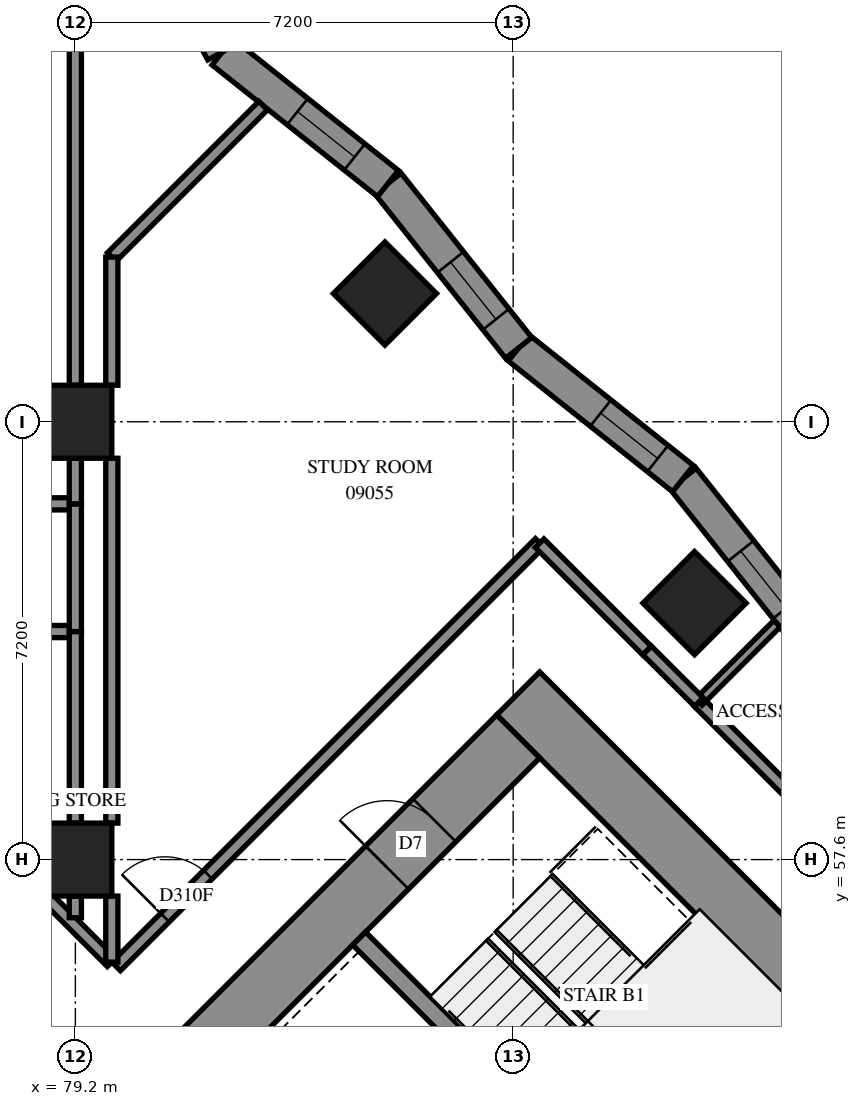
"""IFC4 building model, lengths in metres.
Left out: names, types, materials, properties, quantities, classifications, styles, units other than length and angle.
Written with IfcOpenShell. Run it as: python <this file> out.ifc"""

import sys

from ifc_helpers import new_model, si_unit, direction, frame, frame_2d, origin, origin_2d, place, context, subcontext, project, spatial, polyline, rectangle, outline, extrude, element, fill, save


model = new_model("IFC4")
c1 = context("Model", 3, precision=1e-05, world=origin(), true_north=direction((0.0, 1.0)))
c2 = subcontext(c1, "Body", "Model", "MODEL_VIEW")
j1 = project(units=[si_unit("LENGTHUNIT", "METRE"), si_unit("PLANEANGLEUNIT", "RADIAN")], contexts=[c1])
p1 = place(None, origin())
s1 = spatial("IfcSite", under=j1, at=p1, CompositionType="ELEMENT")
p2 = place(p1, origin())
s2 = spatial("IfcBuilding", under=s1, at=p2, CompositionType="ELEMENT")
p3 = place(p2, frame((0.0, 0.0, 37.2)))
s3 = spatial("IfcBuildingStorey", under=s2, at=p3, CompositionType="ELEMENT", Elevation=37.2)
for number, where, z_axis, x_axis in (
    (1, (79.2, 57.6, 0.0), (0.0, 0.0, 1.0), (1.0, 0.0, 0.0)),
    (2, (79.2, 64.8, 0.0), (0.0, 0.0, 1.0), (1.0, 0.0, 0.0)),
    (3, (84.291, 66.909, 0.0), (0.0, 0.0, 1.0), (0.707, -0.707, 0.0)),
    (4, (89.382, 61.818, 0.0), (0.0, 0.0, 1.0), (0.707, -0.707, 0.0)),
):
    element("IfcColumn", number, at=place(p3, frame(where, z_axis=z_axis, x_axis=x_axis)), inside=s3, PredefinedType="COLUMN", context=c2, shape_type="SweptSolid", body=[
        extrude(rectangle(XDim=1.2, YDim=1.2, at=origin_2d()), origin(), (0.0, 0.0, 1.0), 3.1),
    ])
p4 = place(p3, frame((86.483, 60.333, -0.3), z_axis=(0.0, 0.0, 1.0), x_axis=(0.70710983, -0.7071037324, 0.0)))
e5 = element("IfcWall", 5, at=p4, inside=s3, PredefinedType="SHEAR", context=c2, shape_type="SweptSolid", body=[
    extrude(rectangle(XDim=16.4, YDim=1.0, at=frame_2d((8.2, 0.0))), origin(), (0.0, 0.0, 1.0), 2.7),
])
p5 = place(p4, frame((11.0, 0.0, 0.3)))
e6 = element("IfcOpeningElement", 6, at=p5, cuts=e5, PredefinedType="OPENING", context=c2, shape_type="SweptSolid", body=[
    extrude(rectangle(XDim=0.8, YDim=2.1, at=frame_2d((0.4, 1.05))), frame((0.0, 0.51, 0.0), z_axis=(0.0, -1.0, 0.0), x_axis=(1.0, 0.0, 0.0)), (0.0, 0.0, 1.0), 1.02),
])
p6 = place(p3, frame((76.301, 49.443, -0.3), z_axis=(0.0, 0.0, 1.0), x_axis=(0.7071067812, 0.7071067812, 0.0)))
e7 = element("IfcWall", 7, at=p6, inside=s3, PredefinedType="SHEAR", context=c2, shape_type="SweptSolid", body=[
    extrude(rectangle(XDim=14.4, YDim=1.0, at=frame_2d((7.2, 0.0))), origin(), (0.0, 0.0, 1.0), 2.7),
])
p7 = place(p6, frame((4.55, 0.0, 0.3)))
e8 = element("IfcOpeningElement", 8, at=p7, cuts=e7, PredefinedType="OPENING", context=c2, shape_type="SweptSolid", body=[
    extrude(rectangle(XDim=1.1, YDim=2.1, at=frame_2d((0.55, 1.05))), frame((0.0, 0.51, 0.0), z_axis=(0.0, -1.0, 0.0), x_axis=(1.0, 0.0, 0.0)), (0.0, 0.0, 1.0), 1.02),
])
p8 = place(p6, frame((11.35, 0.0, 0.3)))
e9 = element("IfcOpeningElement", 9, at=p8, cuts=e7, PredefinedType="OPENING", context=c2, shape_type="SweptSolid", body=[
    extrude(rectangle(XDim=1.1, YDim=2.1, at=frame_2d((0.55, 1.05))), frame((0.0, 0.51, 0.0), z_axis=(0.0, -1.0, 0.0), x_axis=(1.0, 0.0, 0.0)), (0.0, 0.0, 1.0), 1.02),
])
p9 = place(p3, frame((83.867, 56.302, 0.0), z_axis=(0.0, 0.0, 1.0), x_axis=(0.7071137256, -0.7070998367, 0.0)))
e10 = element("IfcWall", 10, at=p9, inside=s3, PredefinedType="SOLIDWALL", context=c2, shape_type="SweptSolid", body=[
    extrude(rectangle(XDim=7.2, YDim=0.3, at=frame_2d((3.6, 0.0))), origin(), (0.0, 0.0, 1.0), 3.1),
])
p10 = place(p3, frame((91.344, 61.162, 0.0), z_axis=(0.0, 0.0, 1.0), x_axis=(-0.6225070424, 0.7826141976, 0.0)))
e11 = element("IfcWall", 11, at=p10, inside=s3, PredefinedType="SOLIDWALL", context=c2, shape_type="SweptSolid", body=[
    extrude(outline(polyline([(0.031, -0.275), (3.485, -0.275), (3.423, 0.275), (-0.031, 0.275), (0.031, -0.275)])), origin(), (0.0, 0.0, 1.0), 3.1),
])
p11 = place(p10, frame((0.732, 0.0, 0.5)))
e12 = element("IfcOpeningElement", 12, at=p11, cuts=e11, PredefinedType="OPENING", context=c2, shape_type="SweptSolid", body=[
    extrude(rectangle(XDim=1.2, YDim=2.45, at=frame_2d((0.6, 1.225))), frame((0.0, 0.285, 0.0), z_axis=(0.0, -1.0, 0.0), x_axis=(1.0, 0.0, 0.0)), (0.0, 0.0, 1.0), 0.57),
])
p12 = place(p3, frame((89.194, 63.865, 0.0), z_axis=(0.0, 0.0, 1.0), x_axis=(-0.7826141976, 0.6225070424, 0.0)))
e13 = element("IfcWall", 13, at=p12, inside=s3, PredefinedType="SOLIDWALL", context=c2, shape_type="SweptSolid", body=[
    extrude(outline(polyline([(-0.031, -0.275), (3.423, -0.275), (3.485, 0.275), (0.031, 0.275), (-0.031, -0.275)])), origin(), (0.0, 0.0, 1.0), 3.1),
])
p13 = place(p12, frame((0.532, 0.0, 0.5)))
e14 = element("IfcOpeningElement", 14, at=p13, cuts=e13, PredefinedType="OPENING", context=c2, shape_type="SweptSolid", body=[
    extrude(rectangle(XDim=1.2, YDim=2.45, at=frame_2d((0.6, 1.225))), frame((0.0, 0.285, 0.0), z_axis=(0.0, -1.0, 0.0), x_axis=(1.0, 0.0, 0.0)), (0.0, 0.0, 1.0), 0.57),
])
p14 = place(p3, frame((86.491, 66.015, 0.0), z_axis=(0.0, 0.0, 1.0), x_axis=(-0.6225211477, 0.7826029777, 0.0)))
e15 = element("IfcWall", 15, at=p14, inside=s3, PredefinedType="SOLIDWALL", context=c2, shape_type="SweptSolid", body=[
    extrude(outline(polyline([(0.031, -0.275), (3.485, -0.275), (3.423, 0.275), (-0.031, 0.275), (0.031, -0.275)])), origin(), (0.0, 0.0, 1.0), 3.1),
])
p15 = place(p14, frame((0.601, 0.0, 0.5)))
e16 = element("IfcOpeningElement", 16, at=p15, cuts=e15, PredefinedType="OPENING", context=c2, shape_type="SweptSolid", body=[
    extrude(rectangle(XDim=1.2, YDim=2.45, at=frame_2d((0.6, 1.225))), frame((0.0, 0.285, 0.0), z_axis=(0.0, -1.0, 0.0), x_axis=(1.0, 0.0, 0.0)), (0.0, 0.0, 1.0), 0.57),
])
p16 = place(p3, frame((84.341, 68.718, 0.0), z_axis=(0.0, 0.0, 1.0), x_axis=(-0.7826023277, 0.6225219648, 0.0)))
e17 = element("IfcWall", 17, at=p16, inside=s3, PredefinedType="SOLIDWALL", context=c2, shape_type="SweptSolid", body=[
    extrude(outline(polyline([(-0.031, -0.275), (3.423, -0.275), (3.533, 0.275), (0.031, 0.275), (-0.031, -0.275)])), origin(), (0.0, 0.0, 1.0), 3.1),
])
p17 = place(p16, frame((0.701, 0.0, 0.5)))
e18 = element("IfcOpeningElement", 18, at=p17, cuts=e17, PredefinedType="OPENING", context=c2, shape_type="SweptSolid", body=[
    extrude(rectangle(XDim=1.2, YDim=2.45, at=frame_2d((0.6, 1.225))), frame((0.0, 0.285, 0.0), z_axis=(0.0, -1.0, 0.0), x_axis=(1.0, 0.0, 0.0)), (0.0, 0.0, 1.0), 0.57),
])
p18 = place(p3, frame((81.619, 70.883, 0.0), z_axis=(0.0, 0.0, 1.0), x_axis=(-0.4831532481, 0.875535801, 0.0)))
e19 = element("IfcWall", 19, at=p18, inside=s3, PredefinedType="SOLIDWALL", context=c2, shape_type="SweptSolid", body=[
    extrude(outline(polyline([(0.055, -0.275), (3.627, -0.275), (3.199, 0.275), (-0.055, 0.275), (0.055, -0.275)])), origin(), (0.0, 0.0, 1.0), 3.1),
])
p19 = place(p18, frame((0.801, 0.0, 0.5)))
e20 = element("IfcOpeningElement", 20, at=p19, cuts=e19, PredefinedType="OPENING", context=c2, shape_type="SweptSolid", body=[
    extrude(rectangle(XDim=1.2, YDim=2.45, at=frame_2d((0.6, 1.225))), frame((0.0, 0.285, 0.0), z_axis=(0.0, -1.0, 0.0), x_axis=(1.0, 0.0, 0.0)), (0.0, 0.0, 1.0), 0.57),
])
p20 = place(p3, frame((79.871, 55.843, 0.0), z_axis=(0.0, 0.0, 1.0), x_axis=(0.7071067812, 0.7071067812, 0.0)))
e21 = element("IfcWall", 21, at=p20, inside=s3, PredefinedType="PARTITIONING", context=c2, shape_type="SweptSolid", body=[
    extrude(rectangle(XDim=9.85, YDim=0.2, at=frame_2d((4.925, 0.0))), origin(), (0.0, 0.0, 1.0), 3.1),
])
p21 = place(p20, frame((1.135, 0.0, 0.0)))
e22 = element("IfcOpeningElement", 22, at=p21, cuts=e21, PredefinedType="OPENING", context=c2, shape_type="SweptSolid", body=[
    extrude(rectangle(XDim=1.0, YDim=2.1, at=frame_2d((0.5, 1.05))), frame((0.0, 0.11, 0.0), z_axis=(0.0, -1.0, 0.0), x_axis=(1.0, 0.0, 0.0)), (0.0, 0.0, 1.0), 0.22),
])
p22 = place(p3, frame((89.451, 60.189, 0.0), z_axis=(0.0, 0.0, 1.0), x_axis=(0.7071796965, -0.7070338583, 0.0)))
e23 = element("IfcWall", 23, at=p22, inside=s3, PredefinedType="PARTITIONING", context=c2, shape_type="SweptSolid", body=[
    extrude(rectangle(XDim=9.6, YDim=0.2, at=frame_2d((4.8, 0.0))), origin(), (0.0, 0.0, 1.0), 3.1),
])
p23 = place(p22, frame((7.315, 0.0, 0.0)))
e24 = element("IfcOpeningElement", 24, at=p23, cuts=e23, PredefinedType="OPENING", context=c2, shape_type="SweptSolid", body=[
    extrude(rectangle(XDim=0.9, YDim=2.1, at=frame_2d((0.45, 1.05))), frame((0.0, 0.11, 0.0), z_axis=(0.0, -1.0, 0.0), x_axis=(1.0, 0.0, 0.0)), (0.0, 0.0, 1.0), 0.22),
])
for number, where, z_axis, x_axis in (
    (25, (79.2, 65.4, 0.0), (0.0, 0.0, 1.0), (0.0, 1.0, 0.0)),
    (26, (79.8, 58.2, 0.0), (0.0, 0.0, 1.0), (0.0, 1.0, 0.0)),
):
    element("IfcWall", number, at=place(p3, frame(where, z_axis=z_axis, x_axis=x_axis)), inside=s3, PredefinedType="PARTITIONING", context=c2, shape_type="SweptSolid", body=[
        extrude(rectangle(XDim=6.0, YDim=0.2, at=frame_2d((3.0, 0.0))), origin(), (0.0, 0.0, 1.0), 3.1),
    ])
p24 = place(p3, frame((74.51, 63.45, 0.0), z_axis=(0.0, 0.0, 1.0), x_axis=(1.0, 0.0, 0.0)))
e27 = element("IfcWall", 27, at=p24, inside=s3, PredefinedType="PARTITIONING", context=c2, shape_type="SweptSolid", body=[
    extrude(rectangle(XDim=4.69, YDim=0.2, at=frame_2d((2.345, 0.0))), origin(), (0.0, 0.0, 1.0), 3.1),
])
p25 = place(p24, frame((3.12, 0.0, 0.0)))
e28 = element("IfcOpeningElement", 28, at=p25, cuts=e27, PredefinedType="OPENING", context=c2, shape_type="SweptSolid", body=[
    extrude(rectangle(XDim=0.9, YDim=2.1, at=frame_2d((0.45, 1.05))), frame((0.0, 0.11, 0.0), z_axis=(0.0, -1.0, 0.0), x_axis=(1.0, 0.0, 0.0)), (0.0, 0.0, 1.0), 0.22),
])
p26 = place(p3, frame((74.882, 61.35, 0.0), z_axis=(0.0, 0.0, 1.0), x_axis=(1.0, 0.0, 0.0)))
e29 = element("IfcWall", 29, at=p26, inside=s3, PredefinedType="PARTITIONING", context=c2, shape_type="SweptSolid", body=[
    extrude(rectangle(XDim=4.318, YDim=0.2, at=frame_2d((2.159, 0.0))), origin(), (0.0, 0.0, 1.0), 3.1),
])
p27 = place(p26, frame((0.78, 0.0, 0.0)))
e30 = element("IfcOpeningElement", 30, at=p27, cuts=e29, PredefinedType="OPENING", context=c2, shape_type="SweptSolid", body=[
    extrude(rectangle(XDim=1.0, YDim=2.1, at=frame_2d((0.5, 1.05))), frame((0.0, 0.11, 0.0), z_axis=(0.0, -1.0, 0.0), x_axis=(1.0, 0.0, 0.0)), (0.0, 0.0, 1.0), 0.22),
])
p28 = place(p3, frame((79.799, 67.509, 0.0), z_axis=(0.0, 0.0, 1.0), x_axis=(0.7071067812, 0.7071067812, 0.0)))
e31 = element("IfcWall", 31, at=p28, inside=s3, PredefinedType="PARTITIONING", context=c2, shape_type="SweptSolid", body=[
    extrude(rectangle(XDim=3.521, YDim=0.2, at=frame_2d((1.76, 0.0))), origin(), (0.0, 0.0, 1.0), 3.1),
])
p29 = place(p3, frame((79.2, 58.2, 0.0), z_axis=(0.0, 0.0, 1.0), x_axis=(0.0, 1.0, 0.0)))
e32 = element("IfcWall", 32, at=p29, inside=s3, PredefinedType="PARTITIONING", context=c2, shape_type="SweptSolid", body=[
    extrude(rectangle(XDim=3.15, YDim=0.2, at=frame_2d((1.575, 0.0))), origin(), (0.0, 0.0, 1.0), 3.1),
])
p30 = place(p3, frame((86.835, 62.803, 0.0), z_axis=(0.0, 0.0, 1.0), x_axis=(0.7071067812, -0.7071067812, 0.0)))
e33 = element("IfcWall", 33, at=p30, inside=s3, PredefinedType="PARTITIONING", context=c2, shape_type="SweptSolid", body=[
    extrude(rectangle(XDim=2.498, YDim=0.2, at=frame_2d((1.249, 0.0))), origin(), (0.0, 0.0, 1.0), 3.1),
])
p31 = place(p3, frame((79.8, 65.4, 0.0), z_axis=(0.0, 0.0, 1.0), x_axis=(0.0, 1.0, 0.0)))
e34 = element("IfcWall", 34, at=p31, inside=s3, PredefinedType="PARTITIONING", context=c2, shape_type="SweptSolid", body=[
    extrude(rectangle(XDim=2.108, YDim=0.2, at=frame_2d((1.054, 0.0))), origin(), (0.0, 0.0, 1.0), 3.1),
])
p32 = place(p3, frame((79.2, 61.35, 0.0), z_axis=(0.0, 0.0, 1.0), x_axis=(0.0, 1.0, 0.0)))
e35 = element("IfcWall", 35, at=p32, inside=s3, PredefinedType="PARTITIONING", context=c2, shape_type="SweptSolid", body=[
    extrude(rectangle(XDim=2.1, YDim=0.2, at=frame_2d((1.05, 0.0))), origin(), (0.0, 0.0, 1.0), 3.1),
])
p33 = place(p3, frame((89.453, 60.193, 0.0), z_axis=(0.0, 0.0, 1.0), x_axis=(0.7071342593, 0.7070793021, 0.0)))
e36 = element("IfcWall", 36, at=p33, inside=s3, PredefinedType="PARTITIONING", context=c2, shape_type="SweptSolid", body=[
    extrude(rectangle(XDim=1.82, YDim=0.15, at=frame_2d((0.91, 0.0))), origin(), (0.0, 0.0, 1.0), 3.1),
])
p34 = place(p3, frame((78.711, 56.997, 0.0), z_axis=(0.0, 0.0, 1.0), x_axis=(0.7071067812, -0.7071067812, 0.0)))
e37 = element("IfcWall", 37, at=p34, inside=s3, PredefinedType="PARTITIONING", context=c2, shape_type="SweptSolid", body=[
    extrude(rectangle(XDim=1.536, YDim=0.2, at=frame_2d((0.768, 0.0))), origin(), (0.0, 0.0, 1.0), 3.1),
])
p35 = place(p3, frame((88.603, 61.039, 0.0), z_axis=(0.0, 0.0, 1.0), x_axis=(0.7079391603, -0.7062734211, 0.0)))
e38 = element("IfcWall", 38, at=p35, inside=s3, PredefinedType="PARTITIONING", context=c2, shape_type="SweptSolid", body=[
    extrude(rectangle(XDim=1.201, YDim=0.2, at=frame_2d((0.6, 0.0))), origin(), (0.0, 0.0, 1.0), 3.1),
])
p36 = place(p3, frame((79.8, 55.914, 0.0), z_axis=(0.0, 0.0, 1.0), x_axis=(0.0, 1.0, 0.0)))
e39 = element("IfcWall", 39, at=p36, inside=s3, PredefinedType="PARTITIONING", context=c2, shape_type="SweptSolid", body=[
    extrude(rectangle(XDim=1.086, YDim=0.2, at=frame_2d((0.543, 0.0))), origin(), (0.0, 0.0, 1.0), 3.1),
])
p37 = place(p3, frame((79.2, 63.45, 0.0), z_axis=(0.0, 0.0, 1.0), x_axis=(0.0, 1.0, 0.0)))
e40 = element("IfcWall", 40, at=p37, inside=s3, PredefinedType="PARTITIONING", context=c2, shape_type="SweptSolid", body=[
    extrude(rectangle(XDim=0.75, YDim=0.2, at=frame_2d((0.375, 0.0))), origin(), (0.0, 0.0, 1.0), 3.1),
])
p38 = place(p3, frame((79.2, 56.644, 0.0), z_axis=(0.0, 0.0, 1.0), x_axis=(0.0, 1.0, 0.0)))
e41 = element("IfcWall", 41, at=p38, inside=s3, PredefinedType="PARTITIONING", context=c2, shape_type="SweptSolid", body=[
    extrude(rectangle(XDim=0.356, YDim=0.2, at=frame_2d((0.178, 0.0))), origin(), (0.0, 0.0, 1.0), 3.1),
])
p39 = place(p11, origin())
e42 = element("IfcWindow", 42, at=p39, inside=s3, PartitioningType="SINGLE_PANEL", PredefinedType="WINDOW", context=c2, shape_type="SweptSolid", body=[
    extrude(rectangle(XDim=1.2, YDim=2.45, at=frame_2d((0.6, 1.225))), frame((0.0, 0.155, 0.0), z_axis=(0.0, -1.0, 0.0), x_axis=(1.0, 0.0, 0.0)), (0.0, 0.0, 1.0), 0.06),
])
fill(e12, e42)
p40 = place(p13, origin())
e43 = element("IfcWindow", 43, at=p40, inside=s3, PartitioningType="SINGLE_PANEL", PredefinedType="WINDOW", context=c2, shape_type="SweptSolid", body=[
    extrude(rectangle(XDim=1.2, YDim=2.45, at=frame_2d((0.6, 1.225))), frame((0.0, 0.155, 0.0), z_axis=(0.0, -1.0, 0.0), x_axis=(1.0, 0.0, 0.0)), (0.0, 0.0, 1.0), 0.06),
])
fill(e14, e43)
p41 = place(p15, origin())
e44 = element("IfcWindow", 44, at=p41, inside=s3, PartitioningType="SINGLE_PANEL", PredefinedType="WINDOW", context=c2, shape_type="SweptSolid", body=[
    extrude(rectangle(XDim=1.2, YDim=2.45, at=frame_2d((0.6, 1.225))), frame((0.0, 0.155, 0.0), z_axis=(0.0, -1.0, 0.0), x_axis=(1.0, 0.0, 0.0)), (0.0, 0.0, 1.0), 0.06),
])
fill(e16, e44)
p42 = place(p17, origin())
e45 = element("IfcWindow", 45, at=p42, inside=s3, PartitioningType="SINGLE_PANEL", PredefinedType="WINDOW", context=c2, shape_type="SweptSolid", body=[
    extrude(rectangle(XDim=1.2, YDim=2.45, at=frame_2d((0.6, 1.225))), frame((0.0, 0.155, 0.0), z_axis=(0.0, -1.0, 0.0), x_axis=(1.0, 0.0, 0.0)), (0.0, 0.0, 1.0), 0.06),
])
fill(e18, e45)
p43 = place(p8, origin())
e46 = element("IfcDoor", 46, at=p43, inside=s3, OperationType="SINGLE_SWING_LEFT", PredefinedType="DOOR", context=c2, shape_type="SweptSolid", body=[
    extrude(rectangle(XDim=1.1, YDim=2.1, at=frame_2d((0.55, 1.05))), frame((0.0, 0.025, 0.0), z_axis=(0.0, -1.0, 0.0), x_axis=(1.0, 0.0, 0.0)), (0.0, 0.0, 1.0), 0.05),
])
fill(e9, e46)
p44 = place(p21, origin())
e47 = element("IfcDoor", 47, at=p44, inside=s3, OperationType="SINGLE_SWING_RIGHT", PredefinedType="DOOR", context=c2, shape_type="SweptSolid", body=[
    extrude(rectangle(XDim=1.0, YDim=2.1, at=frame_2d((0.5, 1.05))), frame((0.0, 0.025, 0.0), z_axis=(0.0, -1.0, 0.0), x_axis=(1.0, 0.0, 0.0)), (0.0, 0.0, 1.0), 0.05),
])
fill(e22, e47)
save(model, sys.argv[1])
